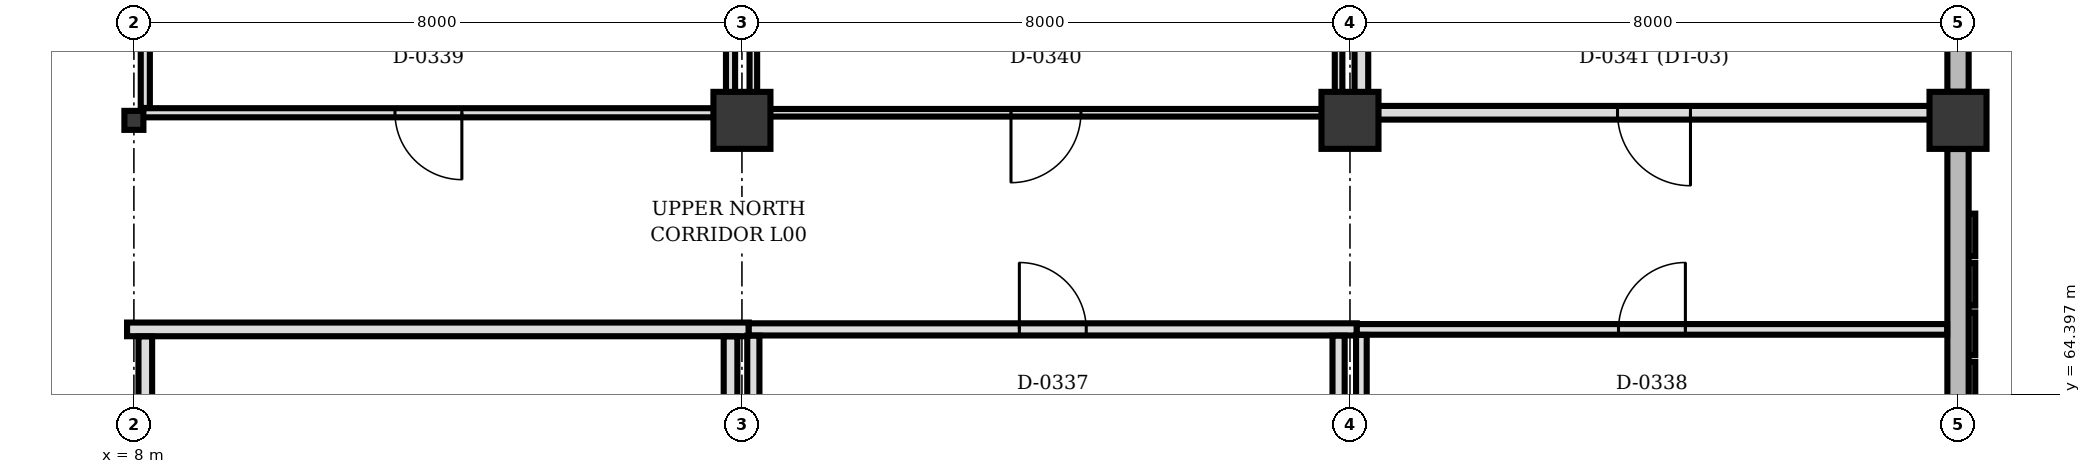
"""IFC4 building model, lengths in metres.
Left out: names, types, materials, properties, quantities, classifications, styles, units other than length and angle.
Written with IfcOpenShell. Run it as: python <this file> out.ifc"""

import sys

from ifc_helpers import new_model, si_unit, direction, frame, frame_2d, origin, origin_2d, place, context, subcontext, project, spatial, rectangle, hollow_rectangle, extrude, element, fill, save


model = new_model("IFC4")
c1 = context("Model", 3, precision=1e-05, world=origin(), true_north=direction((0.0, 1.0)))
c2 = subcontext(c1, "Body", "Model", "MODEL_VIEW")
j1 = project(units=[si_unit("LENGTHUNIT", "METRE"), si_unit("PLANEANGLEUNIT", "RADIAN")], contexts=[c1])
p1 = place(None, origin())
s1 = spatial("IfcSite", under=j1, at=p1, CompositionType="ELEMENT")
p2 = place(p1, origin())
s2 = spatial("IfcBuilding", under=s1, at=p2, CompositionType="ELEMENT")
p3 = place(p2, origin())
s3 = spatial("IfcBuildingStorey", under=s2, at=p3, CompositionType="ELEMENT", Elevation=0.0)
for number, where, z_axis, x_axis in (
    (1, (16.0, 68.0, 0.0), (0.0, 0.0, 1.0), (1.0, 0.0, 0.0)),
    (2, (24.0, 68.0, 0.0), (0.0, 0.0, 1.0), (1.0, 0.0, 0.0)),
    (3, (32.0, 68.0, 0.0), (0.0, 0.0, 1.0), (1.0, 0.0, 0.0)),
):
    element("IfcColumn", number, at=place(p3, frame(where, z_axis=z_axis, x_axis=x_axis)), inside=s3, PredefinedType="COLUMN", context=c2, shape_type="SweptSolid", body=[
        extrude(rectangle(XDim=0.75, YDim=0.75, at=origin_2d()), origin(), (0.0, 0.0, 1.0), 4.5),
    ])
p4 = place(p3, frame((8.0, 68.0, 0.0), z_axis=(0.0, 0.0, 1.0), x_axis=(1.0, 0.0, 0.0)))
e4 = element("IfcColumn", 4, at=p4, inside=s3, PredefinedType="COLUMN", context=c2, shape_type="SweptSolid", body=[
    extrude(hollow_rectangle(XDim=0.25, YDim=0.25, WallThickness=0.01, at=origin_2d()), origin(), (0.0, 0.0, 1.0), 4.5),
])
p5 = place(p3, frame((32.0, 75.623, 0.0), z_axis=(0.0, 0.0, 1.0), x_axis=(0.0, -1.0, 0.0)))
e5 = element("IfcWall", 5, at=p5, inside=s3, PredefinedType="SOLIDWALL", context=c2, shape_type="SweptSolid", body=[
    extrude(rectangle(XDim=7.246, YDim=0.28, at=frame_2d((3.623, 0.0))), origin(), (0.0, 0.0, 1.0), 3.55),
])
p6 = place(p5, frame((4.817, 0.0, 0.9)))
e6 = element("IfcOpeningElement", 6, at=p6, cuts=e5, PredefinedType="OPENING", context=c2, shape_type="SweptSolid", body=[
    extrude(rectangle(XDim=0.8, YDim=1.1, at=frame_2d((0.4, 0.55))), frame((0.0, 0.15, 0.0), z_axis=(0.0, -1.0, 0.0), x_axis=(1.0, 0.0, 0.0)), (0.0, 0.0, 1.0), 0.3),
])
p7 = place(p3, frame((32.0, 67.623, 0.0), z_axis=(0.0, 0.0, 1.0), x_axis=(0.0, -1.0, 0.0)))
e7 = element("IfcWall", 7, at=p7, inside=s3, PredefinedType="SOLIDWALL", context=c2, shape_type="SweptSolid", body=[
    extrude(rectangle(XDim=5.511, YDim=0.28, at=frame_2d((2.755, 0.0))), origin(), (0.0, 0.0, 1.0), 3.382),
])
p8 = place(p3, frame((7.91, 65.25, 0.0), z_axis=(0.0, 0.0, 1.0), x_axis=(1.0, 0.0, 0.0)))
e8 = element("IfcWall", 8, at=p8, inside=s3, PredefinedType="PARTITIONING", context=c2, shape_type="SweptSolid", body=[
    extrude(rectangle(XDim=8.18, YDim=0.18, at=frame_2d((4.09, 0.0))), origin(), (0.0, 0.0, 1.0), 3.532),
])
p9 = place(p3, frame((15.85, 65.157, 0.0), z_axis=(0.0, 0.0, 1.0), x_axis=(0.0, -1.0, 0.0)))
e9 = element("IfcWall", 9, at=p9, inside=s3, PredefinedType="PARTITIONING", context=c2, shape_type="SweptSolid", body=[
    extrude(rectangle(XDim=2.79, YDim=0.18, at=frame_2d((1.395, 0.0))), origin(), (0.0, 0.0, 1.0), 3.632),
])
p10 = place(p3, frame((8.15, 58.26, 0.0), z_axis=(0.0, 0.0, 1.0), x_axis=(0.0, 1.0, 0.0)))
e10 = element("IfcWall", 10, at=p10, inside=s3, PredefinedType="PARTITIONING", context=c2, shape_type="SweptSolid", body=[
    extrude(rectangle(XDim=6.897, YDim=0.18, at=frame_2d((3.448, 0.0))), origin(), (0.0, 0.0, 1.0), 3.382),
])
p11 = place(p10, frame((2.457, 0.0, 0.0)))
e11 = element("IfcOpeningElement", 11, at=p11, cuts=e10, PredefinedType="OPENING", context=c2, shape_type="SweptSolid", body=[
    extrude(rectangle(XDim=0.88, YDim=2.1, at=frame_2d((0.44, 1.05))), frame((0.0, 0.1, 0.0), z_axis=(0.0, -1.0, 0.0), x_axis=(1.0, 0.0, 0.0)), (0.0, 0.0, 1.0), 0.2),
])
p12 = place(p3, frame((16.09, 65.25, 0.0), z_axis=(0.0, 0.0, 1.0), x_axis=(1.0, 0.0, 0.0)))
e12 = element("IfcWall", 12, at=p12, inside=s3, PredefinedType="PARTITIONING", context=c2, shape_type="SweptSolid", body=[
    extrude(rectangle(XDim=8.0, YDim=0.16, at=frame_2d((4.0, 0.0))), origin(), (0.0, 0.0, 1.0), 3.532),
])
p13 = place(p12, frame((3.56, 0.0, 0.0)))
e13 = element("IfcOpeningElement", 13, at=p13, cuts=e12, PredefinedType="OPENING", context=c2, shape_type="SweptSolid", body=[
    extrude(rectangle(XDim=0.88, YDim=2.1, at=frame_2d((0.44, 1.05))), frame((0.0, 0.09, 0.0), z_axis=(0.0, -1.0, 0.0), x_axis=(1.0, 0.0, 0.0)), (0.0, 0.0, 1.0), 0.18),
])
p14 = place(p3, frame((23.85, 65.167, 0.0), z_axis=(0.0, 0.0, 1.0), x_axis=(0.0, -1.0, 0.0)))
e14 = element("IfcWall", 14, at=p14, inside=s3, PredefinedType="PARTITIONING", context=c2, shape_type="SweptSolid", body=[
    extrude(rectangle(XDim=2.8, YDim=0.16, at=frame_2d((1.4, 0.0))), origin(), (0.0, 0.0, 1.0), 3.532),
])
p15 = place(p3, frame((16.15, 62.367, 0.0), z_axis=(0.0, 0.0, 1.0), x_axis=(0.0, 1.0, 0.0)))
e15 = element("IfcWall", 15, at=p15, inside=s3, PredefinedType="PARTITIONING", context=c2, shape_type="SweptSolid", body=[
    extrude(rectangle(XDim=2.8, YDim=0.16, at=frame_2d((1.4, 0.0))), origin(), (0.0, 0.0, 1.0), 3.632),
])
p16 = place(p3, frame((24.09, 65.25, 0.0), z_axis=(0.0, 0.0, 1.0), x_axis=(1.0, 0.0, 0.0)))
e16 = element("IfcWall", 16, at=p16, inside=s3, PredefinedType="PARTITIONING", context=c2, shape_type="SweptSolid", body=[
    extrude(rectangle(XDim=7.767, YDim=0.14, at=frame_2d((3.883, 0.0))), origin(), (0.0, 0.0, 1.0), 3.532),
])
p17 = place(p16, frame((3.443, 0.0, 0.0)))
e17 = element("IfcOpeningElement", 17, at=p17, cuts=e16, PredefinedType="OPENING", context=c2, shape_type="SweptSolid", body=[
    extrude(rectangle(XDim=0.88, YDim=2.1, at=frame_2d((0.44, 1.05))), frame((0.0, 0.08, 0.0), z_axis=(0.0, -1.0, 0.0), x_axis=(1.0, 0.0, 0.0)), (0.0, 0.0, 1.0), 0.16),
])
p18 = place(p3, frame((24.15, 62.367, 0.0), z_axis=(0.0, 0.0, 1.0), x_axis=(0.0, 1.0, 0.0)))
e18 = element("IfcWall", 18, at=p18, inside=s3, PredefinedType="PARTITIONING", context=c2, shape_type="SweptSolid", body=[
    extrude(rectangle(XDim=2.81, YDim=0.14, at=frame_2d((1.405, 0.0))), origin(), (0.0, 0.0, 1.0), 3.532),
])
p19 = place(p3, frame((15.85, 75.633, 0.0), z_axis=(0.0, 0.0, 1.0), x_axis=(0.0, -1.0, 0.0)))
e19 = element("IfcWall", 19, at=p19, inside=s3, PredefinedType="PARTITIONING", context=c2, shape_type="SweptSolid", body=[
    extrude(rectangle(XDim=7.266, YDim=0.12, at=frame_2d((3.633, 0.0))), origin(), (0.0, 0.0, 1.0), 3.632),
])
p20 = place(p3, frame((15.633, 68.1, 0.0), z_axis=(0.0, 0.0, 1.0), x_axis=(-1.0, 0.0, 0.0)))
e20 = element("IfcWall", 20, at=p20, inside=s3, PredefinedType="PARTITIONING", context=c2, shape_type="SweptSolid", body=[
    extrude(rectangle(XDim=7.516, YDim=0.12, at=frame_2d((3.758, 0.0))), origin(), (0.0, 0.0, 1.0), 3.382),
])
p21 = place(p20, frame((3.318, 0.0, 0.0)))
e21 = element("IfcOpeningElement", 21, at=p21, cuts=e20, PredefinedType="OPENING", context=c2, shape_type="SweptSolid", body=[
    extrude(rectangle(XDim=0.88, YDim=2.1, at=frame_2d((0.44, 1.05))), frame((0.0, 0.07, 0.0), z_axis=(0.0, -1.0, 0.0), x_axis=(1.0, 0.0, 0.0)), (0.0, 0.0, 1.0), 0.14),
])
p22 = place(p3, frame((8.15, 68.163, 0.0), z_axis=(0.0, 0.0, 1.0), x_axis=(0.0, 1.0, 0.0)))
e22 = element("IfcWall", 22, at=p22, inside=s3, PredefinedType="PARTITIONING", context=c2, shape_type="SweptSolid", body=[
    extrude(rectangle(XDim=7.47, YDim=0.12, at=frame_2d((3.735, 0.0))), origin(), (0.0, 0.0, 1.0), 3.382),
])
p23 = place(p3, frame((23.85, 75.633, 0.0), z_axis=(0.0, 0.0, 1.0), x_axis=(0.0, -1.0, 0.0)))
e23 = element("IfcWall", 23, at=p23, inside=s3, PredefinedType="PARTITIONING", context=c2, shape_type="SweptSolid", body=[
    extrude(rectangle(XDim=7.266, YDim=0.1, at=frame_2d((3.633, 0.0))), origin(), (0.0, 0.0, 1.0), 3.532),
])
p24 = place(p3, frame((23.633, 68.1, 0.0), z_axis=(0.0, 0.0, 1.0), x_axis=(-1.0, 0.0, 0.0)))
e24 = element("IfcWall", 24, at=p24, inside=s3, PredefinedType="PARTITIONING", context=c2, shape_type="SweptSolid", body=[
    extrude(rectangle(XDim=7.266, YDim=0.1, at=frame_2d((3.633, 0.0))), origin(), (0.0, 0.0, 1.0), 3.382),
])
p25 = place(p24, frame((3.173, 0.0, 0.0)))
e25 = element("IfcOpeningElement", 25, at=p25, cuts=e24, PredefinedType="OPENING", context=c2, shape_type="SweptSolid", body=[
    extrude(rectangle(XDim=0.92, YDim=2.1, at=frame_2d((0.46, 1.05))), frame((0.0, 0.06, 0.0), z_axis=(0.0, -1.0, 0.0), x_axis=(1.0, 0.0, 0.0)), (0.0, 0.0, 1.0), 0.12),
])
p26 = place(p3, frame((16.15, 68.367, 0.0), z_axis=(0.0, 0.0, 1.0), x_axis=(0.0, 1.0, 0.0)))
e26 = element("IfcWall", 26, at=p26, inside=s3, PredefinedType="PARTITIONING", context=c2, shape_type="SweptSolid", body=[
    extrude(rectangle(XDim=7.266, YDim=0.1, at=frame_2d((3.633, 0.0))), origin(), (0.0, 0.0, 1.0), 3.632),
])
p27 = place(p3, frame((31.633, 68.1, 0.0), z_axis=(0.0, 0.0, 1.0), x_axis=(-1.0, 0.0, 0.0)))
e27 = element("IfcWall", 27, at=p27, inside=s3, PredefinedType="PARTITIONING", context=c2, shape_type="SweptSolid", body=[
    extrude(rectangle(XDim=7.266, YDim=0.18, at=frame_2d((3.633, 0.0))), origin(), (0.0, 0.0, 1.0), 3.382),
])
p28 = place(p27, frame((3.153, 0.0, 0.0)))
e28 = element("IfcOpeningElement", 28, at=p28, cuts=e27, PredefinedType="OPENING", context=c2, shape_type="SweptSolid", body=[
    extrude(rectangle(XDim=0.96, YDim=2.1, at=frame_2d((0.48, 1.05))), frame((0.0, 0.1, 0.0), z_axis=(0.0, -1.0, 0.0), x_axis=(1.0, 0.0, 0.0)), (0.0, 0.0, 1.0), 0.2),
])
p29 = place(p3, frame((24.15, 68.367, 0.0), z_axis=(0.0, 0.0, 1.0), x_axis=(0.0, 1.0, 0.0)))
e29 = element("IfcWall", 29, at=p29, inside=s3, PredefinedType="PARTITIONING", context=c2, shape_type="SweptSolid", body=[
    extrude(rectangle(XDim=7.266, YDim=0.18, at=frame_2d((3.633, 0.0))), origin(), (0.0, 0.0, 1.0), 3.532),
])
p30 = place(p13, origin())
e30 = element("IfcDoor", 30, at=p30, inside=s3, OperationType="SINGLE_SWING_LEFT", PredefinedType="DOOR", context=c2, shape_type="SweptSolid", body=[
    extrude(rectangle(XDim=0.88, YDim=2.1, at=frame_2d((0.44, 1.05))), frame((0.0, 0.025, 0.0), z_axis=(0.0, -1.0, 0.0), x_axis=(1.0, 0.0, 0.0)), (0.0, 0.0, 1.0), 0.05),
])
fill(e13, e30)
p31 = place(p17, origin())
e31 = element("IfcDoor", 31, at=p31, inside=s3, OperationType="SINGLE_SWING_RIGHT", PredefinedType="DOOR", context=c2, shape_type="SweptSolid", body=[
    extrude(rectangle(XDim=0.88, YDim=2.1, at=frame_2d((0.44, 1.05))), frame((0.0, 0.025, 0.0), z_axis=(0.0, -1.0, 0.0), x_axis=(1.0, 0.0, 0.0)), (0.0, 0.0, 1.0), 0.05),
])
fill(e17, e31)
p32 = place(p21, origin())
e32 = element("IfcDoor", 32, at=p32, inside=s3, OperationType="SINGLE_SWING_LEFT", PredefinedType="DOOR", context=c2, shape_type="SweptSolid", body=[
    extrude(rectangle(XDim=0.88, YDim=2.1, at=frame_2d((0.44, 1.05))), frame((0.0, 0.025, 0.0), z_axis=(0.0, -1.0, 0.0), x_axis=(1.0, 0.0, 0.0)), (0.0, 0.0, 1.0), 0.05),
])
fill(e21, e32)
p33 = place(p25, origin())
e33 = element("IfcDoor", 33, at=p33, inside=s3, OperationType="SINGLE_SWING_RIGHT", PredefinedType="DOOR", context=c2, shape_type="SweptSolid", body=[
    extrude(rectangle(XDim=0.92, YDim=2.1, at=frame_2d((0.46, 1.05))), frame((0.0, 0.025, 0.0), z_axis=(0.0, -1.0, 0.0), x_axis=(1.0, 0.0, 0.0)), (0.0, 0.0, 1.0), 0.05),
])
fill(e25, e33)
p34 = place(p28, origin())
e34 = element("IfcDoor", 34, at=p34, inside=s3, OperationType="SINGLE_SWING_LEFT", PredefinedType="DOOR", context=c2, shape_type="SweptSolid", body=[
    extrude(rectangle(XDim=0.96, YDim=2.1, at=frame_2d((0.48, 1.05))), frame((0.0, 0.025, 0.0), z_axis=(0.0, -1.0, 0.0), x_axis=(1.0, 0.0, 0.0)), (0.0, 0.0, 1.0), 0.05),
])
fill(e28, e34)
save(model, sys.argv[1])
